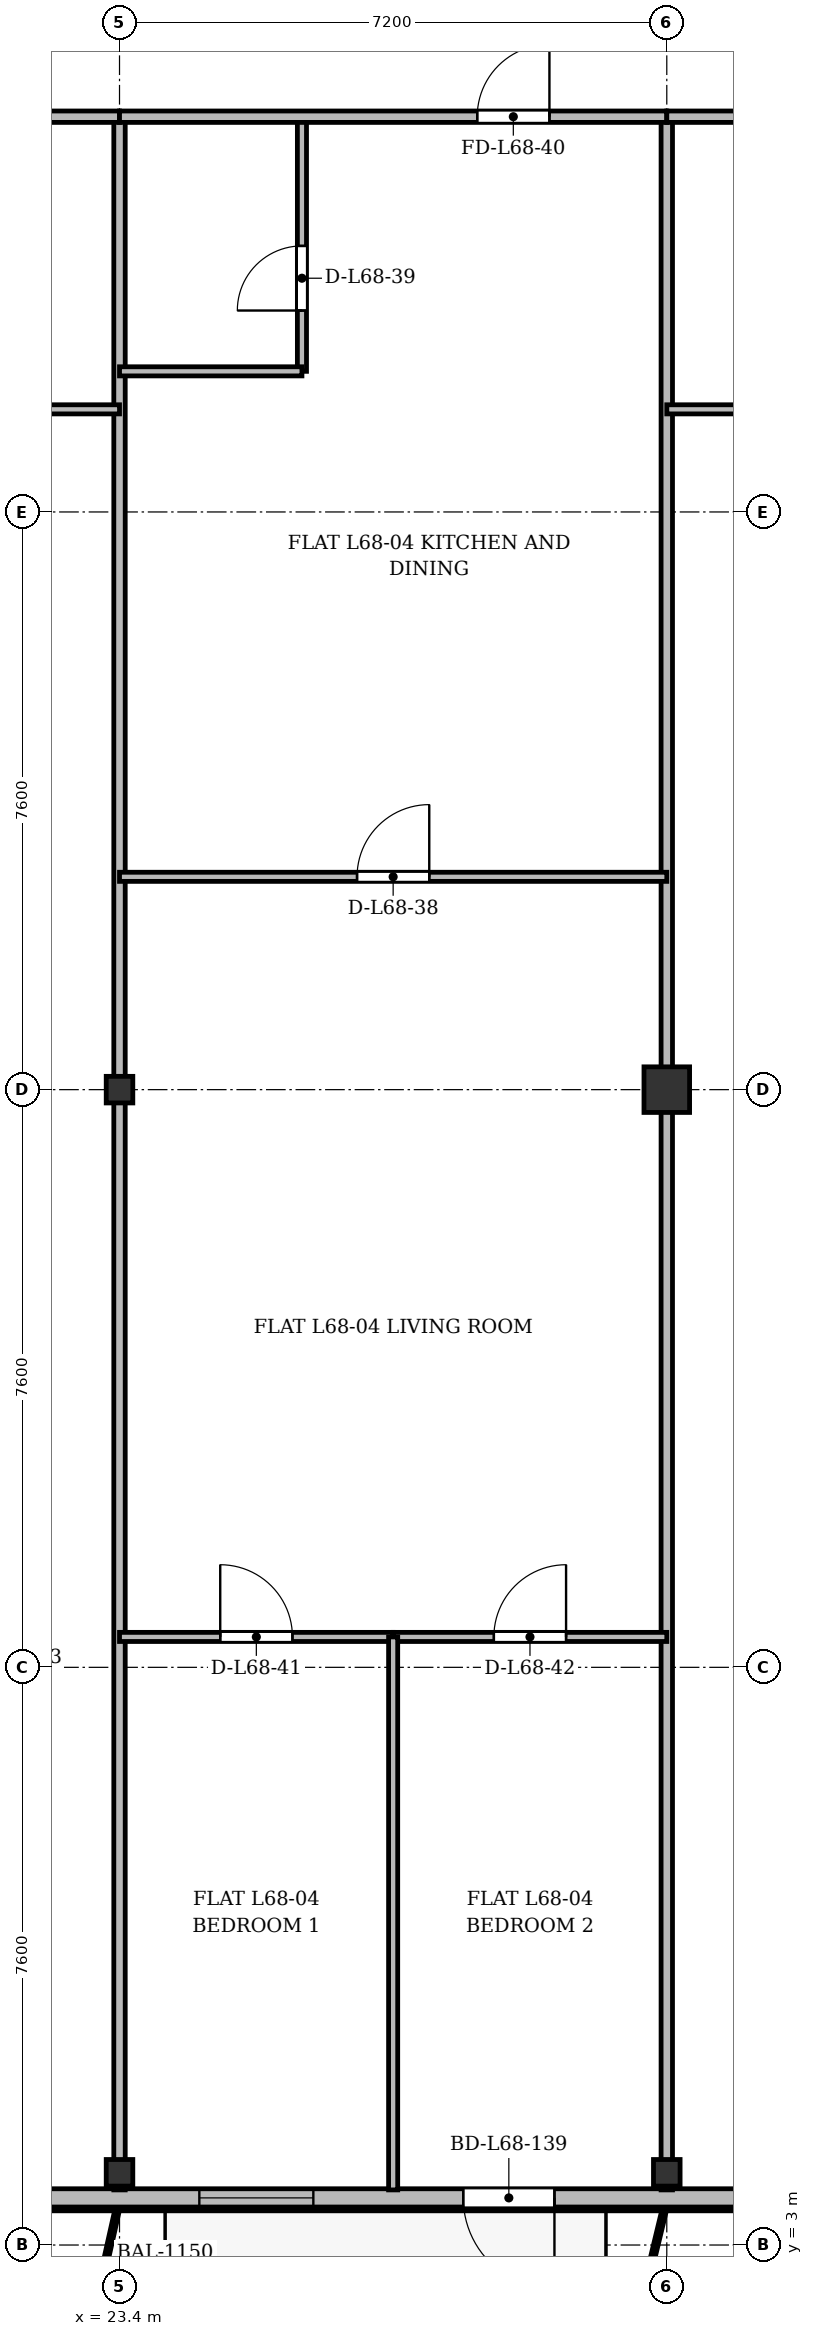
"""IFC4 building model, lengths in metres.
Left out: names, types, materials, properties, quantities, classifications, styles, units other than length and angle.
Written with IfcOpenShell. Run it as: python <this file> out.ifc"""

import sys

from ifc_helpers import new_model, si_unit, direction, frame, frame_2d, origin, origin_2d, place, context, subcontext, project, spatial, rectangle, i_section, extrude, source, transform, mapped, element, fill, save


model = new_model("IFC4")
c1 = context("Model", 3, precision=1e-05, world=origin(), true_north=direction((0.0, 1.0)))
c2 = subcontext(c1, "Body", "Model", "MODEL_VIEW")
j1 = project(units=[si_unit("LENGTHUNIT", "METRE"), si_unit("PLANEANGLEUNIT", "RADIAN")], contexts=[c1])
p1 = place(None, origin())
s1 = spatial("IfcSite", under=j1, at=p1, CompositionType="ELEMENT")
p2 = place(p1, origin())
s2 = spatial("IfcBuilding", under=s1, at=p2, CompositionType="ELEMENT")
p3 = place(p2, frame((0.0, 0.0, 263.1)))
s3 = spatial("IfcBuildingStorey", under=s2, at=p3, CompositionType="ELEMENT", Elevation=263.1)
m1 = source(origin(), c2, "Body", "SweptSolid", [
    extrude(i_section(OverallWidth=0.35, OverallDepth=0.35, WebThickness=0.018, FlangeThickness=0.028, at=origin_2d()), origin(), (0.0, 0.0, 1.0), 3.6),
])
for number, where, z_axis, x_axis in (
    (1, (23.4, 3.95, 0.0), (0.0, 0.0, 1.0), (1.0, 0.0, 0.0)),
    (2, (23.4, 18.2, 0.0), (0.0, 0.0, 1.0), (1.0, 0.0, 0.0)),
    (3, (30.6, 3.95, 0.0), (0.0, 0.0, 1.0), (1.0, 0.0, 0.0)),
):
    element("IfcColumn", number, at=place(p3, frame(where, z_axis=z_axis, x_axis=x_axis)), inside=s3, PredefinedType="COLUMN", context=c2, shape_type="MappedRepresentation", body=[
        mapped(m1, transform((0.0, 0.0, 0.0), x_axis=(1.0, 0.0, 0.0), y_axis=(0.0, 1.0, 0.0), z_axis=(0.0, 0.0, 1.0), scale=1.0)),
    ])
m2 = source(origin(), c2, "Body", "SweptSolid", [
    extrude(rectangle(XDim=0.6, YDim=0.6, at=origin_2d()), origin(), (0.0, 0.0, 1.0), 3.6),
])
p4 = place(p3, frame((30.6, 18.2, 0.0), z_axis=(0.0, 0.0, 1.0), x_axis=(1.0, 0.0, 0.0)))
e4 = element("IfcColumn", 4, at=p4, inside=s3, PredefinedType="COLUMN", context=c2, shape_type="MappedRepresentation", body=[
    mapped(m2, transform((0.0, 0.0, 0.0), x_axis=(1.0, 0.0, 0.0), y_axis=(0.0, 1.0, 0.0), z_axis=(0.0, 0.0, 1.0), scale=1.0)),
])
p5 = place(p3, frame((63.2, 3.62, 0.0), z_axis=(0.0, 0.0, 1.0), x_axis=(-1.0, 0.0, 0.0)))
e5 = element("IfcWall", 5, at=p5, inside=s3, PredefinedType="SOLIDWALL", context=c2, shape_type="SweptSolid", body=[
    extrude(rectangle(XDim=52.0, YDim=0.24, at=frame_2d((26.0, 0.0))), origin(), (0.0, 0.0, 1.0), 3.37),
])
p6 = place(p5, frame((0.345, 0.0, 0.9)))
e6 = element("IfcOpeningElement", 6, at=p6, cuts=e5, PredefinedType="OPENING", context=c2, shape_type="SweptSolid", body=[
    extrude(rectangle(XDim=1.2, YDim=1.65, at=frame_2d((0.6, 0.825))), frame((0.0, 0.13, 0.0), z_axis=(0.0, -1.0, 0.0), x_axis=(1.0, 0.0, 0.0)), (0.0, 0.0, 1.0), 0.26),
])
p7 = place(p5, frame((2.225, 0.0, 0.9)))
e7 = element("IfcOpeningElement", 7, at=p7, cuts=e5, PredefinedType="OPENING", context=c2, shape_type="SweptSolid", body=[
    extrude(rectangle(XDim=1.65, YDim=1.85, at=frame_2d((0.825, 0.925))), frame((0.0, 0.13, 0.0), z_axis=(0.0, -1.0, 0.0), x_axis=(1.0, 0.0, 0.0)), (0.0, 0.0, 1.0), 0.26),
])
p8 = place(p5, frame((5.42, 0.0, 0.0)))
e8 = element("IfcOpeningElement", 8, at=p8, cuts=e5, PredefinedType="OPENING", context=c2, shape_type="SweptSolid", body=[
    extrude(rectangle(XDim=1.2, YDim=2.2, at=frame_2d((0.6, 1.1))), frame((0.0, 0.13, 0.0), z_axis=(0.0, -1.0, 0.0), x_axis=(1.0, 0.0, 0.0)), (0.0, 0.0, 1.0), 0.26),
])
p9 = place(p5, frame((8.4, 0.0, 0.9)))
e9 = element("IfcOpeningElement", 9, at=p9, cuts=e5, PredefinedType="OPENING", context=c2, shape_type="SweptSolid", body=[
    extrude(rectangle(XDim=2.2, YDim=1.8, at=frame_2d((1.1, 0.9))), frame((0.0, 0.13, 0.0), z_axis=(0.0, -1.0, 0.0), x_axis=(1.0, 0.0, 0.0)), (0.0, 0.0, 1.0), 0.26),
])
p10 = place(p5, frame((15.05, 0.0, 0.9)))
e10 = element("IfcOpeningElement", 10, at=p10, cuts=e5, PredefinedType="OPENING", context=c2, shape_type="SweptSolid", body=[
    extrude(rectangle(XDim=1.5, YDim=1.75, at=frame_2d((0.75, 0.875))), frame((0.0, 0.13, 0.0), z_axis=(0.0, -1.0, 0.0), x_axis=(1.0, 0.0, 0.0)), (0.0, 0.0, 1.0), 0.26),
])
p11 = place(p5, frame((20.25, 0.0, 0.9)))
e11 = element("IfcOpeningElement", 11, at=p11, cuts=e5, PredefinedType="OPENING", context=c2, shape_type="SweptSolid", body=[
    extrude(rectangle(XDim=2.0, YDim=1.95, at=frame_2d((1.0, 0.975))), frame((0.0, 0.13, 0.0), z_axis=(0.0, -1.0, 0.0), x_axis=(1.0, 0.0, 0.0)), (0.0, 0.0, 1.0), 0.26),
])
p12 = place(p5, frame((24.125, 0.0, 0.9)))
e12 = element("IfcOpeningElement", 12, at=p12, cuts=e5, PredefinedType="OPENING", context=c2, shape_type="SweptSolid", body=[
    extrude(rectangle(XDim=1.65, YDim=1.85, at=frame_2d((0.825, 0.925))), frame((0.0, 0.13, 0.0), z_axis=(0.0, -1.0, 0.0), x_axis=(1.0, 0.0, 0.0)), (0.0, 0.0, 1.0), 0.26),
])
p13 = place(p5, frame((28.8, 0.0, 0.9)))
e13 = element("IfcOpeningElement", 13, at=p13, cuts=e5, PredefinedType="OPENING", context=c2, shape_type="SweptSolid", body=[
    extrude(rectangle(XDim=1.8, YDim=1.8, at=frame_2d((0.9, 0.9))), frame((0.0, 0.13, 0.0), z_axis=(0.0, -1.0, 0.0), x_axis=(1.0, 0.0, 0.0)), (0.0, 0.0, 1.0), 0.26),
])
p14 = place(p5, frame((34.078, 0.0, 0.0)))
e14 = element("IfcOpeningElement", 14, at=p14, cuts=e5, PredefinedType="OPENING", context=c2, shape_type="SweptSolid", body=[
    extrude(rectangle(XDim=1.2, YDim=2.2, at=frame_2d((0.6, 1.1))), frame((0.0, 0.13, 0.0), z_axis=(0.0, -1.0, 0.0), x_axis=(1.0, 0.0, 0.0)), (0.0, 0.0, 1.0), 0.26),
])
p15 = place(p5, frame((37.25, 0.0, 0.9)))
e15 = element("IfcOpeningElement", 15, at=p15, cuts=e5, PredefinedType="OPENING", context=c2, shape_type="SweptSolid", body=[
    extrude(rectangle(XDim=1.5, YDim=1.75, at=frame_2d((0.75, 0.875))), frame((0.0, 0.13, 0.0), z_axis=(0.0, -1.0, 0.0), x_axis=(1.0, 0.0, 0.0)), (0.0, 0.0, 1.0), 0.26),
])
p16 = place(p5, frame((40.9, 0.0, 0.9)))
e16 = element("IfcOpeningElement", 16, at=p16, cuts=e5, PredefinedType="OPENING", context=c2, shape_type="SweptSolid", body=[
    extrude(rectangle(XDim=2.0, YDim=1.95, at=frame_2d((1.0, 0.975))), frame((0.0, 0.13, 0.0), z_axis=(0.0, -1.0, 0.0), x_axis=(1.0, 0.0, 0.0)), (0.0, 0.0, 1.0), 0.26),
])
p17 = place(p5, frame((44.19, 0.0, 0.9)))
e17 = element("IfcOpeningElement", 17, at=p17, cuts=e5, PredefinedType="OPENING", context=c2, shape_type="SweptSolid", body=[
    extrude(rectangle(XDim=1.65, YDim=1.85, at=frame_2d((0.825, 0.925))), frame((0.0, 0.13, 0.0), z_axis=(0.0, -1.0, 0.0), x_axis=(1.0, 0.0, 0.0)), (0.0, 0.0, 1.0), 0.26),
])
p18 = place(p5, frame((49.855, 0.0, 0.9)))
e18 = element("IfcOpeningElement", 18, at=p18, cuts=e5, PredefinedType="OPENING", context=c2, shape_type="SweptSolid", body=[
    extrude(rectangle(XDim=1.8, YDim=1.8, at=frame_2d((0.9, 0.9))), frame((0.0, 0.13, 0.0), z_axis=(0.0, -1.0, 0.0), x_axis=(1.0, 0.0, 0.0)), (0.0, 0.0, 1.0), 0.26),
])
for number, where, z_axis, x_axis in (
    (19, (23.4, 3.725, 0.0), (0.0, 0.0, 1.0), (0.0, 1.0, 0.0)),
    (20, (30.6, 3.725, 0.0), (0.0, 0.0, 1.0), (0.0, 1.0, 0.0)),
):
    element("IfcWall", number, at=place(p3, frame(where, z_axis=z_axis, x_axis=x_axis)), inside=s3, PredefinedType="PARTITIONING", context=c2, shape_type="SweptSolid", body=[
        extrude(rectangle(XDim=27.275, YDim=0.15, at=frame_2d((13.637, 0.0))), origin(), (0.0, 0.0, 1.0), 2.87),
    ])
p19 = place(p3, frame((19.2, 31.0, 0.0), z_axis=(0.0, 0.0, 1.0), x_axis=(1.0, 0.0, 0.0)))
e21 = element("IfcWall", 21, at=p19, inside=s3, PredefinedType="PARTITIONING", context=c2, shape_type="SweptSolid", body=[
    extrude(rectangle(XDim=4.2, YDim=0.15, at=frame_2d((2.1, 0.0))), origin(), (0.0, 0.0, 1.0), 2.87),
])
p20 = place(p19, frame((1.529, 0.0, 0.0)))
e22 = element("IfcOpeningElement", 22, at=p20, cuts=e21, PredefinedType="OPENING", context=c2, shape_type="SweptSolid", body=[
    extrude(rectangle(XDim=0.95, YDim=2.15, at=frame_2d((0.475, 1.075))), frame((0.0, 0.085, 0.0), z_axis=(0.0, -1.0, 0.0), x_axis=(1.0, 0.0, 0.0)), (0.0, 0.0, 1.0), 0.17),
])
p21 = place(p3, frame((19.2, 27.15, 0.0), z_axis=(0.0, 0.0, 1.0), x_axis=(1.0, 0.0, 0.0)))
e23 = element("IfcWall", 23, at=p21, inside=s3, PredefinedType="PARTITIONING", context=c2, shape_type="SweptSolid", body=[
    extrude(rectangle(XDim=4.2, YDim=0.12, at=frame_2d((2.1, 0.0))), origin(), (0.0, 0.0, 1.0), 2.87),
])
p22 = place(p21, frame((1.529, 0.0, 0.0)))
e24 = element("IfcOpeningElement", 24, at=p22, cuts=e23, PredefinedType="OPENING", context=c2, shape_type="SweptSolid", body=[
    extrude(rectangle(XDim=0.95, YDim=2.15, at=frame_2d((0.475, 1.075))), frame((0.0, 0.07, 0.0), z_axis=(0.0, -1.0, 0.0), x_axis=(1.0, 0.0, 0.0)), (0.0, 0.0, 1.0), 0.14),
])
p23 = place(p3, frame((23.4, 21.0, 0.0), z_axis=(0.0, 0.0, 1.0), x_axis=(1.0, 0.0, 0.0)))
e25 = element("IfcWall", 25, at=p23, inside=s3, PredefinedType="PARTITIONING", context=c2, shape_type="SweptSolid", body=[
    extrude(rectangle(XDim=7.2, YDim=0.12, at=frame_2d((3.6, 0.0))), origin(), (0.0, 0.0, 1.0), 2.87),
])
p24 = place(p23, frame((3.125, 0.0, 0.0)))
e26 = element("IfcOpeningElement", 26, at=p24, cuts=e25, PredefinedType="OPENING", context=c2, shape_type="SweptSolid", body=[
    extrude(rectangle(XDim=0.95, YDim=2.15, at=frame_2d((0.475, 1.075))), frame((0.0, 0.07, 0.0), z_axis=(0.0, -1.0, 0.0), x_axis=(1.0, 0.0, 0.0)), (0.0, 0.0, 1.0), 0.14),
])
p25 = place(p3, frame((25.8, 27.65, 0.0), z_axis=(0.0, 0.0, 1.0), x_axis=(0.0, 1.0, 0.0)))
e27 = element("IfcWall", 27, at=p25, inside=s3, PredefinedType="PARTITIONING", context=c2, shape_type="SweptSolid", body=[
    extrude(rectangle(XDim=3.35, YDim=0.12, at=frame_2d((1.675, 0.0))), origin(), (0.0, 0.0, 1.0), 3.37),
])
p26 = place(p25, frame((0.8, 0.0, 0.0)))
e28 = element("IfcOpeningElement", 28, at=p26, cuts=e27, PredefinedType="OPENING", context=c2, shape_type="SweptSolid", body=[
    extrude(rectangle(XDim=0.85, YDim=2.1, at=frame_2d((0.425, 1.05))), frame((0.0, 0.07, 0.0), z_axis=(0.0, -1.0, 0.0), x_axis=(1.0, 0.0, 0.0)), (0.0, 0.0, 1.0), 0.14),
])
p27 = place(p3, frame((23.4, 27.65, 0.0), z_axis=(0.0, 0.0, 1.0), x_axis=(1.0, 0.0, 0.0)))
e29 = element("IfcWall", 29, at=p27, inside=s3, PredefinedType="PARTITIONING", context=c2, shape_type="SweptSolid", body=[
    extrude(rectangle(XDim=2.4, YDim=0.12, at=frame_2d((1.2, 0.0))), origin(), (0.0, 0.0, 1.0), 2.87),
])
p28 = place(p3, frame((23.4, 31.0, 0.0), z_axis=(0.0, 0.0, 1.0), x_axis=(1.0, 0.0, 0.0)))
e30 = element("IfcWall", 30, at=p28, inside=s3, PredefinedType="PARTITIONING", context=c2, shape_type="SweptSolid", body=[
    extrude(rectangle(XDim=7.2, YDim=0.15, at=frame_2d((3.6, 0.0))), origin(), (0.0, 0.0, 1.0), 2.87),
])
p29 = place(p28, frame((4.706, 0.0, 0.0)))
e31 = element("IfcOpeningElement", 31, at=p29, cuts=e30, PredefinedType="OPENING", context=c2, shape_type="SweptSolid", body=[
    extrude(rectangle(XDim=0.95, YDim=2.15, at=frame_2d((0.475, 1.075))), frame((0.0, 0.085, 0.0), z_axis=(0.0, -1.0, 0.0), x_axis=(1.0, 0.0, 0.0)), (0.0, 0.0, 1.0), 0.17),
])
p30 = place(p3, frame((23.4, 11.0, 0.0), z_axis=(0.0, 0.0, 1.0), x_axis=(1.0, 0.0, 0.0)))
e32 = element("IfcWall", 32, at=p30, inside=s3, PredefinedType="PARTITIONING", context=c2, shape_type="SweptSolid", body=[
    extrude(rectangle(XDim=3.6, YDim=0.12, at=frame_2d((1.8, 0.0))), origin(), (0.0, 0.0, 1.0), 2.87),
])
p31 = place(p30, frame((1.325, 0.0, 0.0)))
e33 = element("IfcOpeningElement", 33, at=p31, cuts=e32, PredefinedType="OPENING", context=c2, shape_type="SweptSolid", body=[
    extrude(rectangle(XDim=0.95, YDim=2.15, at=frame_2d((0.475, 1.075))), frame((0.0, 0.07, 0.0), z_axis=(0.0, -1.0, 0.0), x_axis=(1.0, 0.0, 0.0)), (0.0, 0.0, 1.0), 0.14),
])
p32 = place(p3, frame((27.0, 11.0, 0.0), z_axis=(0.0, 0.0, 1.0), x_axis=(1.0, 0.0, 0.0)))
e34 = element("IfcWall", 34, at=p32, inside=s3, PredefinedType="PARTITIONING", context=c2, shape_type="SweptSolid", body=[
    extrude(rectangle(XDim=3.6, YDim=0.12, at=frame_2d((1.8, 0.0))), origin(), (0.0, 0.0, 1.0), 2.87),
])
p33 = place(p32, frame((1.325, 0.0, 0.0)))
e35 = element("IfcOpeningElement", 35, at=p33, cuts=e34, PredefinedType="OPENING", context=c2, shape_type="SweptSolid", body=[
    extrude(rectangle(XDim=0.95, YDim=2.15, at=frame_2d((0.475, 1.075))), frame((0.0, 0.07, 0.0), z_axis=(0.0, -1.0, 0.0), x_axis=(1.0, 0.0, 0.0)), (0.0, 0.0, 1.0), 0.14),
])
p34 = place(p3, frame((27.0, 3.725, 0.0), z_axis=(0.0, 0.0, 1.0), x_axis=(0.0, 1.0, 0.0)))
e36 = element("IfcWall", 36, at=p34, inside=s3, PredefinedType="PARTITIONING", context=c2, shape_type="SweptSolid", body=[
    extrude(rectangle(XDim=7.275, YDim=0.12, at=frame_2d((3.637, 0.0))), origin(), (0.0, 0.0, 1.0), 2.92),
])
p35 = place(p3, frame((30.6, 31.0, 0.0), z_axis=(0.0, 0.0, 1.0), x_axis=(1.0, 0.0, 0.0)))
e37 = element("IfcWall", 37, at=p35, inside=s3, PredefinedType="PARTITIONING", context=c2, shape_type="SweptSolid", body=[
    extrude(rectangle(XDim=5.8, YDim=0.15, at=frame_2d((2.9, 0.0))), origin(), (0.0, 0.0, 1.0), 2.87),
])
p36 = place(p35, frame((2.425, 0.0, 0.0)))
e38 = element("IfcOpeningElement", 38, at=p36, cuts=e37, PredefinedType="OPENING", context=c2, shape_type="SweptSolid", body=[
    extrude(rectangle(XDim=0.95, YDim=2.15, at=frame_2d((0.475, 1.075))), frame((0.0, 0.085, 0.0), z_axis=(0.0, -1.0, 0.0), x_axis=(1.0, 0.0, 0.0)), (0.0, 0.0, 1.0), 0.17),
])
p37 = place(p3, frame((30.6, 27.15, 0.0), z_axis=(0.0, 0.0, 1.0), x_axis=(1.0, 0.0, 0.0)))
e39 = element("IfcWall", 39, at=p37, inside=s3, PredefinedType="PARTITIONING", context=c2, shape_type="SweptSolid", body=[
    extrude(rectangle(XDim=5.8, YDim=0.12, at=frame_2d((2.9, 0.0))), origin(), (0.0, 0.0, 1.0), 2.87),
])
p38 = place(p37, frame((2.425, 0.0, 0.0)))
e40 = element("IfcOpeningElement", 40, at=p38, cuts=e39, PredefinedType="OPENING", context=c2, shape_type="SweptSolid", body=[
    extrude(rectangle(XDim=0.95, YDim=2.15, at=frame_2d((0.475, 1.075))), frame((0.0, 0.07, 0.0), z_axis=(0.0, -1.0, 0.0), x_axis=(1.0, 0.0, 0.0)), (0.0, 0.0, 1.0), 0.14),
])
m3 = source(origin(), c2, "Body", "SweptSolid", [
    extrude(rectangle(XDim=1.2, YDim=2.2, at=frame_2d((0.6, 1.1))), frame((0.0, 0.025, 0.0), z_axis=(0.0, -1.0, 0.0), x_axis=(1.0, 0.0, 0.0)), (0.0, 0.0, 1.0), 0.05),
])
p39 = place(p14, origin())
e41 = element("IfcDoor", 41, at=p39, inside=s3, OperationType="SINGLE_SWING_LEFT", PredefinedType="DOOR", context=c2, shape_type="MappedRepresentation", body=[
    mapped(m3, transform((0.0, 0.0, 0.0), x_axis=(1.0, 0.0, 0.0), y_axis=(0.0, 1.0, 0.0), z_axis=(0.0, 0.0, 1.0), scale=1.0)),
])
fill(e14, e41)
m4 = source(origin(), c2, "Body", "SweptSolid", [
    extrude(rectangle(XDim=1.5, YDim=1.75, at=frame_2d((0.75, 0.875))), frame((0.0, 0.03, 0.0), z_axis=(0.0, -1.0, 0.0), x_axis=(1.0, 0.0, 0.0)), (0.0, 0.0, 1.0), 0.06),
])
p40 = place(p15, origin())
e42 = element("IfcWindow", 42, at=p40, inside=s3, PartitioningType="SINGLE_PANEL", PredefinedType="WINDOW", context=c2, shape_type="MappedRepresentation", body=[
    mapped(m4, transform((0.0, 0.0, 0.0), x_axis=(1.0, 0.0, 0.0), y_axis=(0.0, 1.0, 0.0), z_axis=(0.0, 0.0, 1.0), scale=1.0)),
])
fill(e15, e42)
m5 = source(origin(), c2, "Body", "SweptSolid", [
    extrude(rectangle(XDim=0.95, YDim=2.15, at=frame_2d((0.475, 1.075))), frame((0.0, 0.025, 0.0), z_axis=(0.0, -1.0, 0.0), x_axis=(1.0, 0.0, 0.0)), (0.0, 0.0, 1.0), 0.05),
])
p41 = place(p24, origin())
e43 = element("IfcDoor", 43, at=p41, inside=s3, OperationType="SINGLE_SWING_RIGHT", PredefinedType="DOOR", context=c2, shape_type="MappedRepresentation", body=[
    mapped(m5, transform((0.0, 0.0, 0.0), x_axis=(1.0, 0.0, 0.0), y_axis=(0.0, 1.0, 0.0), z_axis=(0.0, 0.0, 1.0), scale=1.0)),
])
fill(e26, e43)
m6 = source(origin(), c2, "Body", "SweptSolid", [
    extrude(rectangle(XDim=0.85, YDim=2.1, at=frame_2d((0.425, 1.05))), frame((0.0, 0.025, 0.0), z_axis=(0.0, -1.0, 0.0), x_axis=(1.0, 0.0, 0.0)), (0.0, 0.0, 1.0), 0.05),
])
p42 = place(p26, origin())
e44 = element("IfcDoor", 44, at=p42, inside=s3, OperationType="SINGLE_SWING_LEFT", PredefinedType="DOOR", context=c2, shape_type="MappedRepresentation", body=[
    mapped(m6, transform((0.0, 0.0, 0.0), x_axis=(1.0, 0.0, 0.0), y_axis=(0.0, 1.0, 0.0), z_axis=(0.0, 0.0, 1.0), scale=1.0)),
])
fill(e28, e44)
p43 = place(p29, origin())
e45 = element("IfcDoor", 45, at=p43, inside=s3, OperationType="SINGLE_SWING_RIGHT", PredefinedType="DOOR", context=c2, shape_type="MappedRepresentation", body=[
    mapped(m5, transform((0.0, 0.0, 0.0), x_axis=(1.0, 0.0, 0.0), y_axis=(0.0, 1.0, 0.0), z_axis=(0.0, 0.0, 1.0), scale=1.0)),
])
fill(e31, e45)
p44 = place(p31, origin())
e46 = element("IfcDoor", 46, at=p44, inside=s3, OperationType="SINGLE_SWING_LEFT", PredefinedType="DOOR", context=c2, shape_type="MappedRepresentation", body=[
    mapped(m5, transform((0.0, 0.0, 0.0), x_axis=(1.0, 0.0, 0.0), y_axis=(0.0, 1.0, 0.0), z_axis=(0.0, 0.0, 1.0), scale=1.0)),
])
fill(e33, e46)
p45 = place(p33, origin())
e47 = element("IfcDoor", 47, at=p45, inside=s3, OperationType="SINGLE_SWING_RIGHT", PredefinedType="DOOR", context=c2, shape_type="MappedRepresentation", body=[
    mapped(m5, transform((0.0, 0.0, 0.0), x_axis=(1.0, 0.0, 0.0), y_axis=(0.0, 1.0, 0.0), z_axis=(0.0, 0.0, 1.0), scale=1.0)),
])
fill(e35, e47)
save(model, sys.argv[1])
